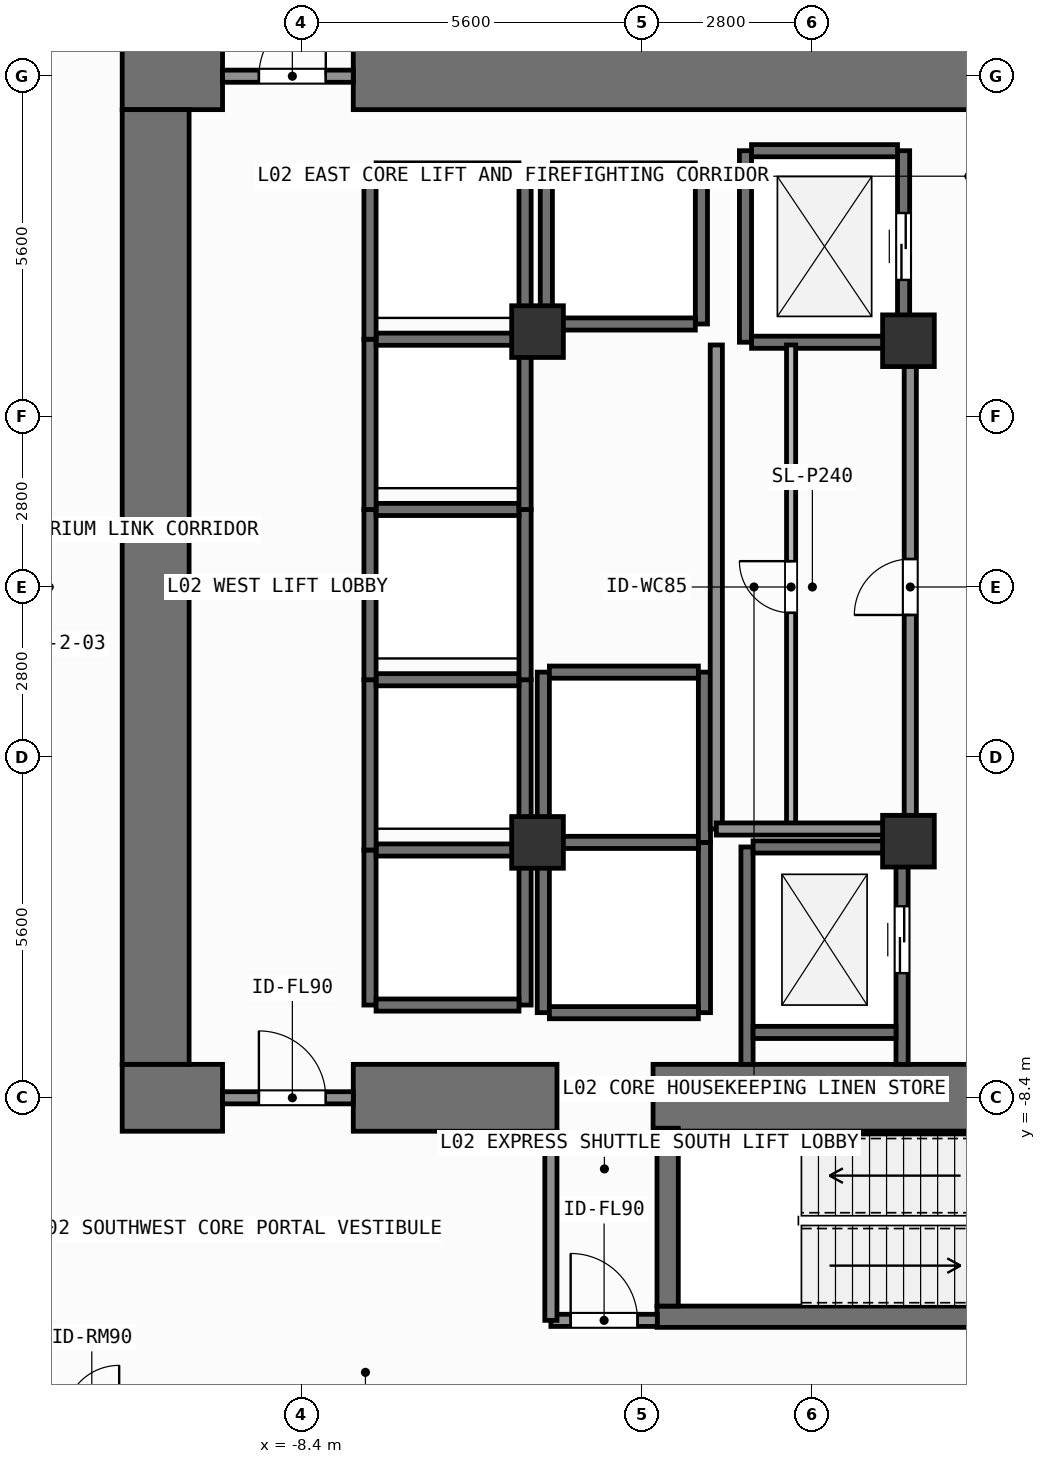
"""IFC4 building model, lengths in metres.
Left out: names, types, materials, properties, quantities, classifications, styles, units other than length and angle.
Written with IfcOpenShell. Run it as: python <this file> out.ifc"""

import sys

from ifc_helpers import new_model, si_unit, direction, frame, frame_2d, origin, origin_2d, place, context, subcontext, project, spatial, rectangle, extrude, element, fill, save


model = new_model("IFC4")
c1 = context("Model", 3, precision=1e-05, world=origin(), true_north=direction((0.0, 1.0)))
c2 = subcontext(c1, "Body", "Model", "MODEL_VIEW")
j1 = project(units=[si_unit("LENGTHUNIT", "METRE"), si_unit("PLANEANGLEUNIT", "RADIAN")], contexts=[c1])
p1 = place(None, origin())
s1 = spatial("IfcSite", under=j1, at=p1, CompositionType="ELEMENT")
p2 = place(p1, origin())
s2 = spatial("IfcBuilding", under=s1, at=p2, CompositionType="ELEMENT")
p3 = place(p2, frame((0.0, 0.0, 4.8)))
s3 = spatial("IfcBuildingStorey", under=s2, at=p3, CompositionType="ELEMENT", Elevation=4.8)
p4 = place(p3, frame((-11.35, -8.4, 0.0), z_axis=(0.0, 0.0, 1.0), x_axis=(1.0, 0.0, 0.0)))
e1 = element("IfcWall", 1, at=p4, inside=s3, PredefinedType="SHEAR", context=c2, shape_type="SweptSolid", body=[
    extrude(rectangle(XDim=1.65, YDim=1.1, at=frame_2d((0.825, 0.0))), origin(), (0.0, 0.0, 1.0), 4.2),
])
p5 = place(p3, frame((-7.55, -8.4, 0.0), z_axis=(0.0, 0.0, 1.0), x_axis=(1.0, 0.0, 0.0)))
e2 = element("IfcWall", 2, at=p5, inside=s3, PredefinedType="SHEAR", context=c2, shape_type="SweptSolid", body=[
    extrude(rectangle(XDim=3.35, YDim=1.1, at=frame_2d((1.675, 0.0))), origin(), (0.0, 0.0, 1.0), 4.2),
])
p6 = place(p3, frame((-2.62, -8.4, 0.0), z_axis=(0.0, 0.0, 1.0), x_axis=(1.0, 0.0, 0.0)))
e3 = element("IfcWall", 3, at=p6, inside=s3, PredefinedType="SHEAR", context=c2, shape_type="SweptSolid", body=[
    extrude(rectangle(XDim=7.27, YDim=1.1, at=frame_2d((3.635, 0.0))), origin(), (0.0, 0.0, 1.0), 4.2),
])
p7 = place(p3, frame((-11.35, 8.4, 0.0), z_axis=(0.0, 0.0, 1.0), x_axis=(1.0, 0.0, 0.0)))
e4 = element("IfcWall", 4, at=p7, inside=s3, PredefinedType="SHEAR", context=c2, shape_type="SweptSolid", body=[
    extrude(rectangle(XDim=1.65, YDim=1.1, at=frame_2d((0.825, 0.0))), origin(), (0.0, 0.0, 1.0), 4.2),
])
p8 = place(p3, frame((-7.55, 8.4, 0.0), z_axis=(0.0, 0.0, 1.0), x_axis=(1.0, 0.0, 0.0)))
e5 = element("IfcWall", 5, at=p8, inside=s3, PredefinedType="SHEAR", context=c2, shape_type="SweptSolid", body=[
    extrude(rectangle(XDim=16.5, YDim=1.1, at=frame_2d((8.25, 0.0))), origin(), (0.0, 0.0, 1.0), 4.2),
])
p9 = place(p3, frame((-10.8, -7.85, 0.0), z_axis=(0.0, 0.0, 1.0), x_axis=(0.0, 1.0, 0.0)))
e6 = element("IfcWall", 6, at=p9, inside=s3, PredefinedType="SHEAR", context=c2, shape_type="SweptSolid", body=[
    extrude(rectangle(XDim=15.7, YDim=1.1, at=frame_2d((7.85, 0.0))), origin(), (0.0, 0.0, 1.0), 4.2),
])
p10 = place(p3, frame((-2.555, -12.0, 0.0), z_axis=(0.0, 0.0, 1.0), x_axis=(1.0, 0.0, 0.0)))
e7 = element("IfcWall", 7, at=p10, inside=s3, PredefinedType="SHEAR", context=c2, shape_type="SweptSolid", body=[
    extrude(rectangle(XDim=7.31, YDim=0.35, at=frame_2d((3.655, 0.0))), origin(), (0.0, 0.0, 1.0), 4.2),
])
p11 = place(p3, frame((-2.2, -8.988, 0.0), z_axis=(0.0, 0.0, 1.0), x_axis=(1.0, 0.0, 0.0)))
e8 = element("IfcWall", 8, at=p11, inside=s3, PredefinedType="SHEAR", context=c2, shape_type="SweptSolid", body=[
    extrude(rectangle(XDim=6.6, YDim=0.075, at=frame_2d((3.3, 0.0))), origin(), (0.0, 0.0, 1.0), 4.2),
])
p12 = place(p3, frame((-2.38, -11.825, 0.0), z_axis=(0.0, 0.0, 1.0), x_axis=(0.0, 1.0, 0.0)))
e9 = element("IfcWall", 9, at=p12, inside=s3, PredefinedType="SHEAR", context=c2, shape_type="SweptSolid", body=[
    extrude(rectangle(XDim=2.925, YDim=0.35, at=frame_2d((1.462, 0.0))), origin(), (0.0, 0.0, 1.0), 4.2),
])
for number, where, z_axis, x_axis in (
    (10, (-4.52, -4.2, 0.0), (0.0, 0.0, 1.0), (1.0, 0.0, 0.0)),
    (11, (1.58, -4.18, 0.0), (0.0, 0.0, 1.0), (1.0, 0.0, 0.0)),
    (12, (1.58, 4.05, 0.0), (0.0, 0.0, 1.0), (1.0, 0.0, 0.0)),
    (13, (-4.52, 4.2, 0.0), (0.0, 0.0, 1.0), (1.0, 0.0, 0.0)),
):
    element("IfcColumn", number, at=place(p3, frame(where, z_axis=z_axis, x_axis=x_axis)), inside=s3, PredefinedType="COLUMN", context=c2, shape_type="SweptSolid", body=[
        extrude(rectangle(XDim=0.85, YDim=0.85, at=origin_2d()), origin(), (0.0, 0.0, 1.0), 4.2),
    ])
for number, where, z_axis, x_axis in (
    (14, (-7.275, -6.875, 0.0), (0.0, 0.0, 1.0), (0.0, 1.0, 0.0)),
    (15, (-4.725, -6.875, 0.0), (0.0, 0.0, 1.0), (0.0, 1.0, 0.0)),
):
    element("IfcWall", number, at=place(p3, frame(where, z_axis=z_axis, x_axis=x_axis)), inside=s3, PredefinedType="SHEAR", context=c2, shape_type="SweptSolid", body=[
        extrude(rectangle(XDim=2.55, YDim=0.2, at=frame_2d((1.275, 0.0))), origin(), (0.0, 0.0, 1.0), 3.96),
    ])
for number, where, z_axis, x_axis in (
    (16, (-7.175, -6.875, 0.0), (0.0, 0.0, 1.0), (1.0, 0.0, 0.0)),
    (17, (-7.175, -4.325, 0.0), (0.0, 0.0, 1.0), (1.0, 0.0, 0.0)),
):
    element("IfcWall", number, at=place(p3, frame(where, z_axis=z_axis, x_axis=x_axis)), inside=s3, PredefinedType="SHEAR", context=c2, shape_type="SweptSolid", body=[
        extrude(rectangle(XDim=2.35, YDim=0.2, at=frame_2d((1.175, 0.0))), origin(), (0.0, 0.0, 1.0), 3.96),
    ])
for number, where, z_axis, x_axis in (
    (18, (-7.275, -4.325, 0.0), (0.0, 0.0, 1.0), (0.0, 1.0, 0.0)),
    (19, (-4.725, -4.325, 0.0), (0.0, 0.0, 1.0), (0.0, 1.0, 0.0)),
):
    element("IfcWall", number, at=place(p3, frame(where, z_axis=z_axis, x_axis=x_axis)), inside=s3, PredefinedType="SHEAR", context=c2, shape_type="SweptSolid", body=[
        extrude(rectangle(XDim=2.8, YDim=0.2, at=frame_2d((1.4, 0.0))), origin(), (0.0, 0.0, 1.0), 3.96),
    ])
p13 = place(p3, frame((-7.175, -1.525, 0.0), z_axis=(0.0, 0.0, 1.0), x_axis=(1.0, 0.0, 0.0)))
e20 = element("IfcWall", 20, at=p13, inside=s3, PredefinedType="SHEAR", context=c2, shape_type="SweptSolid", body=[
    extrude(rectangle(XDim=2.35, YDim=0.2, at=frame_2d((1.175, 0.0))), origin(), (0.0, 0.0, 1.0), 3.96),
])
for number, where, z_axis, x_axis in (
    (21, (-7.275, -1.525, 0.0), (0.0, 0.0, 1.0), (0.0, 1.0, 0.0)),
    (22, (-4.725, -1.525, 0.0), (0.0, 0.0, 1.0), (0.0, 1.0, 0.0)),
):
    element("IfcWall", number, at=place(p3, frame(where, z_axis=z_axis, x_axis=x_axis)), inside=s3, PredefinedType="SHEAR", context=c2, shape_type="SweptSolid", body=[
        extrude(rectangle(XDim=2.8, YDim=0.2, at=frame_2d((1.4, 0.0))), origin(), (0.0, 0.0, 1.0), 3.96),
    ])
p14 = place(p3, frame((-7.175, 1.275, 0.0), z_axis=(0.0, 0.0, 1.0), x_axis=(1.0, 0.0, 0.0)))
e23 = element("IfcWall", 23, at=p14, inside=s3, PredefinedType="SHEAR", context=c2, shape_type="SweptSolid", body=[
    extrude(rectangle(XDim=2.35, YDim=0.2, at=frame_2d((1.175, 0.0))), origin(), (0.0, 0.0, 1.0), 3.96),
])
for number, where, z_axis, x_axis in (
    (24, (-7.275, 1.275, 0.0), (0.0, 0.0, 1.0), (0.0, 1.0, 0.0)),
    (25, (-4.725, 1.275, 0.0), (0.0, 0.0, 1.0), (0.0, 1.0, 0.0)),
):
    element("IfcWall", number, at=place(p3, frame(where, z_axis=z_axis, x_axis=x_axis)), inside=s3, PredefinedType="SHEAR", context=c2, shape_type="SweptSolid", body=[
        extrude(rectangle(XDim=2.8, YDim=0.2, at=frame_2d((1.4, 0.0))), origin(), (0.0, 0.0, 1.0), 3.96),
    ])
p15 = place(p3, frame((-7.175, 4.075, 0.0), z_axis=(0.0, 0.0, 1.0), x_axis=(1.0, 0.0, 0.0)))
e26 = element("IfcWall", 26, at=p15, inside=s3, PredefinedType="SHEAR", context=c2, shape_type="SweptSolid", body=[
    extrude(rectangle(XDim=2.35, YDim=0.2, at=frame_2d((1.175, 0.0))), origin(), (0.0, 0.0, 1.0), 3.96),
])
for number, where, z_axis, x_axis in (
    (27, (-7.275, 4.075, 0.0), (0.0, 0.0, 1.0), (0.0, 1.0, 0.0)),
    (28, (-4.725, 4.075, 0.0), (0.0, 0.0, 1.0), (0.0, 1.0, 0.0)),
):
    element("IfcWall", number, at=place(p3, frame(where, z_axis=z_axis, x_axis=x_axis)), inside=s3, PredefinedType="SHEAR", context=c2, shape_type="SweptSolid", body=[
        extrude(rectangle(XDim=2.8, YDim=0.2, at=frame_2d((1.4, 0.0))), origin(), (0.0, 0.0, 1.0), 3.96),
    ])
p16 = place(p3, frame((-7.175, 6.875, 0.0), z_axis=(0.0, 0.0, 1.0), x_axis=(1.0, 0.0, 0.0)))
e29 = element("IfcWall", 29, at=p16, inside=s3, PredefinedType="SHEAR", context=c2, shape_type="SweptSolid", body=[
    extrude(rectangle(XDim=2.35, YDim=0.2, at=frame_2d((1.175, 0.0))), origin(), (0.0, 0.0, 1.0), 3.96),
])
for number, where, z_axis, x_axis in (
    (30, (-4.375, 4.325, 0.0), (0.0, 0.0, 1.0), (0.0, 1.0, 0.0)),
    (31, (-1.825, 4.325, 0.0), (0.0, 0.0, 1.0), (0.0, 1.0, 0.0)),
):
    element("IfcWall", number, at=place(p3, frame(where, z_axis=z_axis, x_axis=x_axis)), inside=s3, PredefinedType="SHEAR", context=c2, shape_type="SweptSolid", body=[
        extrude(rectangle(XDim=2.55, YDim=0.2, at=frame_2d((1.275, 0.0))), origin(), (0.0, 0.0, 1.0), 3.96),
    ])
for number, where, z_axis, x_axis in (
    (32, (-4.275, 4.325, 0.0), (0.0, 0.0, 1.0), (1.0, 0.0, 0.0)),
    (33, (-4.275, 6.875, 0.0), (0.0, 0.0, 1.0), (1.0, 0.0, 0.0)),
):
    element("IfcWall", number, at=place(p3, frame(where, z_axis=z_axis, x_axis=x_axis)), inside=s3, PredefinedType="SHEAR", context=c2, shape_type="SweptSolid", body=[
        extrude(rectangle(XDim=2.35, YDim=0.2, at=frame_2d((1.175, 0.0))), origin(), (0.0, 0.0, 1.0), 3.96),
    ])
for number, where, z_axis, x_axis in (
    (34, (-4.425, -7.0, 0.0), (0.0, 0.0, 1.0), (0.0, 1.0, 0.0)),
    (35, (-1.775, -7.0, 0.0), (0.0, 0.0, 1.0), (0.0, 1.0, 0.0)),
):
    element("IfcWall", number, at=place(p3, frame(where, z_axis=z_axis, x_axis=x_axis)), inside=s3, PredefinedType="SHEAR", context=c2, shape_type="SweptSolid", body=[
        extrude(rectangle(XDim=2.8, YDim=0.2, at=frame_2d((1.4, 0.0))), origin(), (0.0, 0.0, 1.0), 3.96),
    ])
for number, where, z_axis, x_axis in (
    (36, (-4.325, -7.0, 0.0), (0.0, 0.0, 1.0), (1.0, 0.0, 0.0)),
    (37, (-4.325, -4.2, 0.0), (0.0, 0.0, 1.0), (1.0, 0.0, 0.0)),
):
    element("IfcWall", number, at=place(p3, frame(where, z_axis=z_axis, x_axis=x_axis)), inside=s3, PredefinedType="SHEAR", context=c2, shape_type="SweptSolid", body=[
        extrude(rectangle(XDim=2.45, YDim=0.2, at=frame_2d((1.225, 0.0))), origin(), (0.0, 0.0, 1.0), 3.96),
    ])
for number, where, z_axis, x_axis in (
    (38, (-4.425, -4.2, 0.0), (0.0, 0.0, 1.0), (0.0, 1.0, 0.0)),
    (39, (-1.775, -4.2, 0.0), (0.0, 0.0, 1.0), (0.0, 1.0, 0.0)),
):
    element("IfcWall", number, at=place(p3, frame(where, z_axis=z_axis, x_axis=x_axis)), inside=s3, PredefinedType="SHEAR", context=c2, shape_type="SweptSolid", body=[
        extrude(rectangle(XDim=2.8, YDim=0.2, at=frame_2d((1.4, 0.0))), origin(), (0.0, 0.0, 1.0), 3.96),
    ])
p17 = place(p3, frame((-4.325, -1.4, 0.0), z_axis=(0.0, 0.0, 1.0), x_axis=(1.0, 0.0, 0.0)))
e40 = element("IfcWall", 40, at=p17, inside=s3, PredefinedType="SHEAR", context=c2, shape_type="SweptSolid", body=[
    extrude(rectangle(XDim=2.45, YDim=0.2, at=frame_2d((1.225, 0.0))), origin(), (0.0, 0.0, 1.0), 3.96),
])
p18 = place(p3, frame((-1.1, 4.025, 0.0), z_axis=(0.0, 0.0, 1.0), x_axis=(0.0, 1.0, 0.0)))
e41 = element("IfcWall", 41, at=p18, inside=s3, PredefinedType="SHEAR", context=c2, shape_type="SweptSolid", body=[
    extrude(rectangle(XDim=3.15, YDim=0.2, at=frame_2d((1.575, 0.0))), origin(), (0.0, 0.0, 1.0), 3.96),
])
p19 = place(p3, frame((1.5, 4.025, 0.0), z_axis=(0.0, 0.0, 1.0), x_axis=(0.0, 1.0, 0.0)))
e42 = element("IfcWall", 42, at=p19, inside=s3, PredefinedType="SHEAR", context=c2, shape_type="SweptSolid", body=[
    extrude(rectangle(XDim=3.15, YDim=0.2, at=frame_2d((1.575, 0.0))), origin(), (0.0, 0.0, 1.0), 3.96),
])
p20 = place(p19, frame((1.025, 0.0, 0.0)))
e43 = element("IfcOpeningElement", 43, at=p20, cuts=e42, PredefinedType="OPENING", context=c2, shape_type="SweptSolid", body=[
    extrude(rectangle(XDim=1.1, YDim=2.2, at=frame_2d((0.55, 1.1))), frame((0.0, 0.11, 0.0), z_axis=(0.0, -1.0, 0.0), x_axis=(1.0, 0.0, 0.0)), (0.0, 0.0, 1.0), 0.22),
])
for number, where, z_axis, x_axis in (
    (44, (-1.0, 4.025, 0.0), (0.0, 0.0, 1.0), (1.0, 0.0, 0.0)),
    (45, (-1.0, 7.175, 0.0), (0.0, 0.0, 1.0), (1.0, 0.0, 0.0)),
):
    element("IfcWall", number, at=place(p3, frame(where, z_axis=z_axis, x_axis=x_axis)), inside=s3, PredefinedType="SHEAR", context=c2, shape_type="SweptSolid", body=[
        extrude(rectangle(XDim=2.4, YDim=0.2, at=frame_2d((1.2, 0.0))), origin(), (0.0, 0.0, 1.0), 3.96),
    ])
p21 = place(p3, frame((-1.075, -7.85, 0.0), z_axis=(0.0, 0.0, 1.0), x_axis=(0.0, 1.0, 0.0)))
e46 = element("IfcWall", 46, at=p21, inside=s3, PredefinedType="SHEAR", context=c2, shape_type="SweptSolid", body=[
    extrude(rectangle(XDim=3.575, YDim=0.2, at=frame_2d((1.788, 0.0))), origin(), (0.0, 0.0, 1.0), 3.96),
])
p22 = place(p3, frame((1.475, -7.85, 0.0), z_axis=(0.0, 0.0, 1.0), x_axis=(0.0, 1.0, 0.0)))
e47 = element("IfcWall", 47, at=p22, inside=s3, PredefinedType="SHEAR", context=c2, shape_type="SweptSolid", body=[
    extrude(rectangle(XDim=3.575, YDim=0.2, at=frame_2d((1.788, 0.0))), origin(), (0.0, 0.0, 1.0), 3.96),
])
p23 = place(p22, frame((1.5, 0.0, 0.0)))
e48 = element("IfcOpeningElement", 48, at=p23, cuts=e47, PredefinedType="OPENING", context=c2, shape_type="SweptSolid", body=[
    extrude(rectangle(XDim=1.1, YDim=2.2, at=frame_2d((0.55, 1.1))), frame((0.0, 0.11, 0.0), z_axis=(0.0, -1.0, 0.0), x_axis=(1.0, 0.0, 0.0)), (0.0, 0.0, 1.0), 0.22),
])
for number, where, z_axis, x_axis in (
    (49, (-0.975, -7.325, 0.0), (0.0, 0.0, 1.0), (1.0, 0.0, 0.0)),
    (50, (-0.975, -4.275, 0.0), (0.0, 0.0, 1.0), (1.0, 0.0, 0.0)),
):
    element("IfcWall", number, at=place(p3, frame(where, z_axis=z_axis, x_axis=x_axis)), inside=s3, PredefinedType="SHEAR", context=c2, shape_type="SweptSolid", body=[
        extrude(rectangle(XDim=2.35, YDim=0.2, at=frame_2d((1.175, 0.0))), origin(), (0.0, 0.0, 1.0), 3.96),
    ])
p24 = place(p3, frame((-9.7, -8.4, 0.0), z_axis=(0.0, 0.0, 1.0), x_axis=(1.0, 0.0, 0.0)))
e51 = element("IfcWall", 51, at=p24, inside=s3, PredefinedType="SOLIDWALL", context=c2, shape_type="SweptSolid", body=[
    extrude(rectangle(XDim=2.15, YDim=0.2, at=frame_2d((1.075, 0.0))), origin(), (0.0, 0.0, 1.0), 3.0),
])
p25 = place(p24, frame((0.598, 0.0, 0.0)))
e52 = element("IfcOpeningElement", 52, at=p25, cuts=e51, PredefinedType="OPENING", context=c2, shape_type="SweptSolid", body=[
    extrude(rectangle(XDim=1.1, YDim=2.15, at=frame_2d((0.55, 1.075))), frame((0.0, 0.11, 0.0), z_axis=(0.0, -1.0, 0.0), x_axis=(1.0, 0.0, 0.0)), (0.0, 0.0, 1.0), 0.22),
])
p26 = place(p3, frame((-9.7, 8.4, 0.0), z_axis=(0.0, 0.0, 1.0), x_axis=(1.0, 0.0, 0.0)))
e53 = element("IfcWall", 53, at=p26, inside=s3, PredefinedType="SOLIDWALL", context=c2, shape_type="SweptSolid", body=[
    extrude(rectangle(XDim=2.15, YDim=0.2, at=frame_2d((1.075, 0.0))), origin(), (0.0, 0.0, 1.0), 3.0),
])
p27 = place(p26, frame((0.598, 0.0, 0.0)))
e54 = element("IfcOpeningElement", 54, at=p27, cuts=e53, PredefinedType="OPENING", context=c2, shape_type="SweptSolid", body=[
    extrude(rectangle(XDim=1.1, YDim=2.15, at=frame_2d((0.55, 1.075))), frame((0.0, 0.11, 0.0), z_axis=(0.0, -1.0, 0.0), x_axis=(1.0, 0.0, 0.0)), (0.0, 0.0, 1.0), 0.22),
])
p28 = place(p3, frame((-4.3, -12.06, 0.0), z_axis=(0.0, 0.0, 1.0), x_axis=(1.0, 0.0, 0.0)))
e55 = element("IfcWall", 55, at=p28, inside=s3, PredefinedType="SOLIDWALL", context=c2, shape_type="SweptSolid", body=[
    extrude(rectangle(XDim=1.75, YDim=0.2, at=frame_2d((0.875, 0.0))), origin(), (0.0, 0.0, 1.0), 3.96),
])
p29 = place(p28, frame((0.325, 0.0, 0.0)))
e56 = element("IfcOpeningElement", 56, at=p29, cuts=e55, PredefinedType="OPENING", context=c2, shape_type="SweptSolid", body=[
    extrude(rectangle(XDim=1.1, YDim=2.15, at=frame_2d((0.55, 1.075))), frame((0.0, 0.11, 0.0), z_axis=(0.0, -1.0, 0.0), x_axis=(1.0, 0.0, 0.0)), (0.0, 0.0, 1.0), 0.22),
])
p30 = place(p3, frame((-0.35, -3.98, 0.0), z_axis=(0.0, 0.0, 1.0), x_axis=(0.0, 1.0, 0.0)))
e57 = element("IfcWall", 57, at=p30, inside=s3, PredefinedType="PARTITIONING", context=c2, shape_type="SweptSolid", body=[
    extrude(rectangle(XDim=7.96, YDim=0.15, at=frame_2d((3.98, 0.0))), origin(), (0.0, 0.0, 1.0), 3.96),
])
p31 = place(p30, frame((3.555, 0.0, 0.0)))
e58 = element("IfcOpeningElement", 58, at=p31, cuts=e57, PredefinedType="OPENING", context=c2, shape_type="SweptSolid", body=[
    extrude(rectangle(XDim=0.85, YDim=2.1, at=frame_2d((0.425, 1.05))), frame((0.0, 0.085, 0.0), z_axis=(0.0, -1.0, 0.0), x_axis=(1.0, 0.0, 0.0)), (0.0, 0.0, 1.0), 0.17),
])
p32 = place(p3, frame((1.61, -3.98, 0.0), z_axis=(0.0, 0.0, 1.0), x_axis=(0.0, 1.0, 0.0)))
e59 = element("IfcWall", 59, at=p32, inside=s3, PredefinedType="SOLIDWALL", context=c2, shape_type="SweptSolid", body=[
    extrude(rectangle(XDim=7.96, YDim=0.2, at=frame_2d((3.98, 0.0))), origin(), (0.0, 0.0, 1.0), 3.96),
])
p33 = place(p32, frame((3.52, 0.0, 0.0)))
e60 = element("IfcOpeningElement", 60, at=p33, cuts=e59, PredefinedType="OPENING", context=c2, shape_type="SweptSolid", body=[
    extrude(rectangle(XDim=0.92, YDim=2.1, at=frame_2d((0.46, 1.05))), frame((0.0, 0.11, 0.0), z_axis=(0.0, -1.0, 0.0), x_axis=(1.0, 0.0, 0.0)), (0.0, 0.0, 1.0), 0.22),
])
p34 = place(p3, frame((-4.3, -12.06, 0.0), z_axis=(0.0, 0.0, 1.0), x_axis=(0.0, 1.0, 0.0)))
e61 = element("IfcWall", 61, at=p34, inside=s3, PredefinedType="SOLIDWALL", context=c2, shape_type="SweptSolid", body=[
    extrude(rectangle(XDim=3.11, YDim=0.2, at=frame_2d((1.555, 0.0))), origin(), (0.0, 0.0, 1.0), 3.96),
])
p35 = place(p3, frame((-1.58, -3.98, 0.0), z_axis=(0.0, 0.0, 1.0), x_axis=(0.0, 1.0, 0.0)))
e62 = element("IfcWall", 62, at=p35, inside=s3, PredefinedType="SOLIDWALL", context=c2, shape_type="SweptSolid", body=[
    extrude(rectangle(XDim=7.96, YDim=0.2, at=frame_2d((3.98, 0.0))), origin(), (0.0, 0.0, 1.0), 3.96),
])
p36 = place(p3, frame((-1.58, -3.98, 0.0), z_axis=(0.0, 0.0, 1.0), x_axis=(1.0, 0.0, 0.0)))
e63 = element("IfcWall", 63, at=p36, inside=s3, PredefinedType="SOLIDWALL", context=c2, shape_type="SweptSolid", body=[
    extrude(rectangle(XDim=3.19, YDim=0.2, at=frame_2d((1.595, 0.0))), origin(), (0.0, 0.0, 1.0), 3.96),
])
p37 = place(p20, origin())
e64 = element("IfcDoor", 64, at=p37, inside=s3, OperationType="SLIDING_TO_LEFT", PredefinedType="DOOR", context=c2, shape_type="SweptSolid", body=[
    extrude(rectangle(XDim=1.1, YDim=2.2, at=frame_2d((0.55, 1.1))), frame((0.0, 0.025, 0.0), z_axis=(0.0, -1.0, 0.0), x_axis=(1.0, 0.0, 0.0)), (0.0, 0.0, 1.0), 0.05),
])
fill(e43, e64)
p38 = place(p23, origin())
e65 = element("IfcDoor", 65, at=p38, inside=s3, OperationType="SLIDING_TO_LEFT", PredefinedType="DOOR", context=c2, shape_type="SweptSolid", body=[
    extrude(rectangle(XDim=1.1, YDim=2.2, at=frame_2d((0.55, 1.1))), frame((0.0, 0.025, 0.0), z_axis=(0.0, -1.0, 0.0), x_axis=(1.0, 0.0, 0.0)), (0.0, 0.0, 1.0), 0.05),
])
fill(e48, e65)
p39 = place(p25, origin())
e66 = element("IfcDoor", 66, at=p39, inside=s3, OperationType="SINGLE_SWING_LEFT", PredefinedType="DOOR", context=c2, shape_type="SweptSolid", body=[
    extrude(rectangle(XDim=1.1, YDim=2.15, at=frame_2d((0.55, 1.075))), frame((0.0, 0.025, 0.0), z_axis=(0.0, -1.0, 0.0), x_axis=(1.0, 0.0, 0.0)), (0.0, 0.0, 1.0), 0.05),
])
fill(e52, e66)
p40 = place(p27, origin())
e67 = element("IfcDoor", 67, at=p40, inside=s3, OperationType="SINGLE_SWING_RIGHT", PredefinedType="DOOR", context=c2, shape_type="SweptSolid", body=[
    extrude(rectangle(XDim=1.1, YDim=2.15, at=frame_2d((0.55, 1.075))), frame((0.0, 0.025, 0.0), z_axis=(0.0, -1.0, 0.0), x_axis=(1.0, 0.0, 0.0)), (0.0, 0.0, 1.0), 0.05),
])
fill(e54, e67)
p41 = place(p29, origin())
e68 = element("IfcDoor", 68, at=p41, inside=s3, OperationType="SINGLE_SWING_LEFT", PredefinedType="DOOR", context=c2, shape_type="SweptSolid", body=[
    extrude(rectangle(XDim=1.1, YDim=2.15, at=frame_2d((0.55, 1.075))), frame((0.0, 0.025, 0.0), z_axis=(0.0, -1.0, 0.0), x_axis=(1.0, 0.0, 0.0)), (0.0, 0.0, 1.0), 0.05),
])
fill(e56, e68)
p42 = place(p31, origin())
e69 = element("IfcDoor", 69, at=p42, inside=s3, OperationType="SINGLE_SWING_RIGHT", PredefinedType="DOOR", context=c2, shape_type="SweptSolid", body=[
    extrude(rectangle(XDim=0.85, YDim=2.1, at=frame_2d((0.425, 1.05))), frame((0.0, 0.025, 0.0), z_axis=(0.0, -1.0, 0.0), x_axis=(1.0, 0.0, 0.0)), (0.0, 0.0, 1.0), 0.05),
])
fill(e58, e69)
p43 = place(p33, origin())
e70 = element("IfcDoor", 70, at=p43, inside=s3, OperationType="SINGLE_SWING_LEFT", PredefinedType="DOOR", context=c2, shape_type="SweptSolid", body=[
    extrude(rectangle(XDim=0.92, YDim=2.1, at=frame_2d((0.46, 1.05))), frame((0.0, 0.025, 0.0), z_axis=(0.0, -1.0, 0.0), x_axis=(1.0, 0.0, 0.0)), (0.0, 0.0, 1.0), 0.05),
])
fill(e60, e70)
save(model, sys.argv[1])
